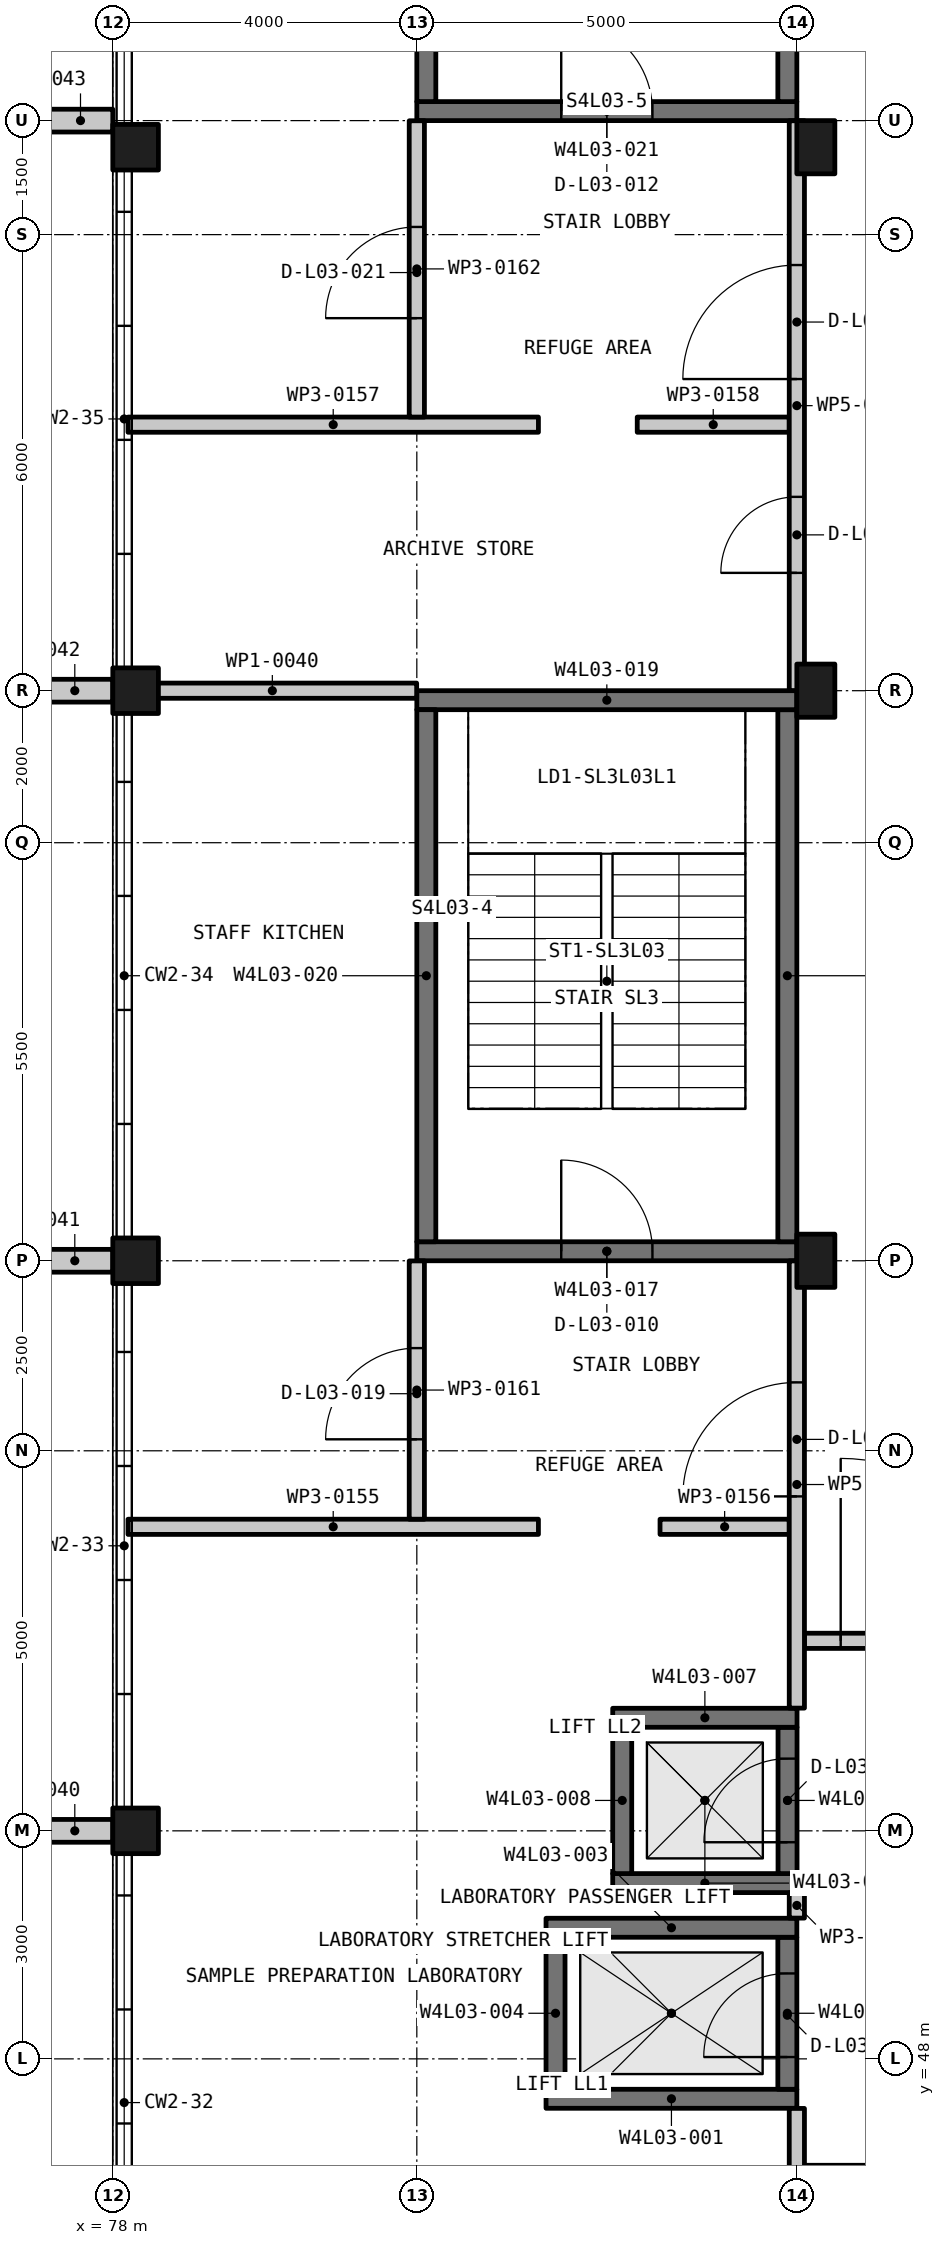
"""IFC4 building model, lengths in metres.
Left out: names, types, materials, properties, quantities, classifications, styles, units other than length and angle.
Written with IfcOpenShell. Run it as: python <this file> out.ifc"""

import sys

from ifc_helpers import new_model, si_unit, direction, frame, frame_2d, origin, origin_2d, place, context, subcontext, project, spatial, rectangle, extrude, element, fill, save


model = new_model("IFC4")
c1 = context("Model", 3, precision=1e-05, world=origin(), true_north=direction((0.0, 1.0)))
c2 = subcontext(c1, "Body", "Model", "MODEL_VIEW")
j1 = project(units=[si_unit("LENGTHUNIT", "METRE"), si_unit("PLANEANGLEUNIT", "RADIAN")], contexts=[c1])
p1 = place(None, origin())
s1 = spatial("IfcSite", under=j1, at=p1, CompositionType="ELEMENT")
p2 = place(p1, origin())
s2 = spatial("IfcBuilding", under=s1, at=p2, CompositionType="ELEMENT")
p3 = place(p2, frame((0.0, 0.0, 15.75)))
s3 = spatial("IfcBuildingStorey", under=s2, at=p3, CompositionType="ELEMENT", Elevation=15.75)
for number, where, z_axis, x_axis in (
    (1, (78.3, 51.0, -0.3), (0.0, 0.0, 1.0), (1.0, 0.0, 0.0)),
    (2, (78.3, 58.5, -0.3), (0.0, 0.0, 1.0), (1.0, 0.0, 0.0)),
    (3, (78.3, 66.0, -0.3), (0.0, 0.0, 1.0), (1.0, 0.0, 0.0)),
    (4, (78.3, 73.15, -0.3), (0.0, 0.0, 1.0), (1.0, 0.0, 0.0)),
):
    element("IfcColumn", number, at=place(p3, frame(where, z_axis=z_axis, x_axis=x_axis)), inside=s3, PredefinedType="COLUMN", context=c2, shape_type="SweptSolid", body=[
        extrude(rectangle(XDim=0.6, YDim=0.6, at=origin_2d()), origin(), (0.0, 0.0, 1.0), 4.5),
    ])
for number, where, z_axis, x_axis in (
    (5, (87.25, 58.5, -0.3), (0.0, 0.0, 1.0), (1.0, 0.0, 0.0)),
    (6, (87.25, 66.0, -0.3), (0.0, 0.0, 1.0), (1.0, 0.0, 0.0)),
    (7, (87.25, 73.15, -0.3), (0.0, 0.0, 1.0), (1.0, 0.0, 0.0)),
):
    element("IfcColumn", number, at=place(p3, frame(where, z_axis=z_axis, x_axis=x_axis)), inside=s3, PredefinedType="COLUMN", context=c2, shape_type="SweptSolid", body=[
        extrude(rectangle(XDim=0.5, YDim=0.7, at=origin_2d()), origin(), (0.0, 0.0, 1.0), 4.5),
    ])
p4 = place(p3, frame((83.7, 47.475, -0.3), z_axis=(0.0, 0.0, 1.0), x_axis=(1.0, 0.0, 0.0)))
e8 = element("IfcWall", 8, at=p4, inside=s3, PredefinedType="SHEAR", context=c2, shape_type="SweptSolid", body=[
    extrude(rectangle(XDim=3.3, YDim=0.25, at=frame_2d((1.65, 0.0))), origin(), (0.0, 0.0, 1.0), 4.5),
])
p5 = place(p3, frame((86.875, 47.6, -0.3), z_axis=(0.0, 0.0, 1.0), x_axis=(0.0, 1.0, 0.0)))
e9 = element("IfcWall", 9, at=p5, inside=s3, PredefinedType="SHEAR", context=c2, shape_type="SweptSolid", body=[
    extrude(rectangle(XDim=2.0, YDim=0.25, at=frame_2d((1.0, 0.0))), origin(), (0.0, 0.0, 1.0), 4.5),
])
p6 = place(p5, frame((0.424, 0.0, 0.3)))
e10 = element("IfcOpeningElement", 10, at=p6, cuts=e9, PredefinedType="OPENING", context=c2, shape_type="SweptSolid", body=[
    extrude(rectangle(XDim=1.1, YDim=2.1, at=frame_2d((0.55, 1.05))), frame((0.0, 0.135, 0.0), z_axis=(0.0, -1.0, 0.0), x_axis=(1.0, 0.0, 0.0)), (0.0, 0.0, 1.0), 0.27),
])
p7 = place(p3, frame((83.7, 49.725, -0.3), z_axis=(0.0, 0.0, 1.0), x_axis=(1.0, 0.0, 0.0)))
e11 = element("IfcWall", 11, at=p7, inside=s3, PredefinedType="SHEAR", context=c2, shape_type="SweptSolid", body=[
    extrude(rectangle(XDim=3.3, YDim=0.25, at=frame_2d((1.65, 0.0))), origin(), (0.0, 0.0, 1.0), 4.5),
])
p8 = place(p3, frame((83.825, 47.6, -0.3), z_axis=(0.0, 0.0, 1.0), x_axis=(0.0, 1.0, 0.0)))
e12 = element("IfcWall", 12, at=p8, inside=s3, PredefinedType="SHEAR", context=c2, shape_type="SweptSolid", body=[
    extrude(rectangle(XDim=2.0, YDim=0.25, at=frame_2d((1.0, 0.0))), origin(), (0.0, 0.0, 1.0), 4.5),
])
p9 = place(p3, frame((84.577, 50.312, -0.3), z_axis=(0.0, 0.0, 1.0), x_axis=(1.0, 0.0, 0.0)))
e13 = element("IfcWall", 13, at=p9, inside=s3, PredefinedType="SHEAR", context=c2, shape_type="SweptSolid", body=[
    extrude(rectangle(XDim=2.425, YDim=0.25, at=frame_2d((1.212, 0.0))), origin(), (0.0, 0.0, 1.0), 4.5),
])
p10 = place(p3, frame((86.877, 50.438, -0.3), z_axis=(0.0, 0.0, 1.0), x_axis=(0.0, 1.0, 0.0)))
e14 = element("IfcWall", 14, at=p10, inside=s3, PredefinedType="SHEAR", context=c2, shape_type="SweptSolid", body=[
    extrude(rectangle(XDim=1.925, YDim=0.25, at=frame_2d((0.962, 0.0))), origin(), (0.0, 0.0, 1.0), 4.5),
])
p11 = place(p10, frame((0.413, 0.0, 0.3)))
e15 = element("IfcOpeningElement", 15, at=p11, cuts=e14, PredefinedType="OPENING", context=c2, shape_type="SweptSolid", body=[
    extrude(rectangle(XDim=1.1, YDim=2.1, at=frame_2d((0.55, 1.05))), frame((0.0, 0.135, 0.0), z_axis=(0.0, -1.0, 0.0), x_axis=(1.0, 0.0, 0.0)), (0.0, 0.0, 1.0), 0.27),
])
p12 = place(p3, frame((84.577, 52.488, -0.3), z_axis=(0.0, 0.0, 1.0), x_axis=(1.0, 0.0, 0.0)))
e16 = element("IfcWall", 16, at=p12, inside=s3, PredefinedType="SHEAR", context=c2, shape_type="SweptSolid", body=[
    extrude(rectangle(XDim=2.425, YDim=0.25, at=frame_2d((1.212, 0.0))), origin(), (0.0, 0.0, 1.0), 4.5),
])
p13 = place(p3, frame((84.702, 50.438, -0.3), z_axis=(0.0, 0.0, 1.0), x_axis=(0.0, 1.0, 0.0)))
e17 = element("IfcWall", 17, at=p13, inside=s3, PredefinedType="SHEAR", context=c2, shape_type="SweptSolid", body=[
    extrude(rectangle(XDim=1.925, YDim=0.25, at=frame_2d((0.962, 0.0))), origin(), (0.0, 0.0, 1.0), 4.5),
])
p14 = place(p3, frame((82.0, 58.625, -0.3), z_axis=(0.0, 0.0, 1.0), x_axis=(1.0, 0.0, 0.0)))
e18 = element("IfcWall", 18, at=p14, inside=s3, PredefinedType="SHEAR", context=c2, shape_type="SweptSolid", body=[
    extrude(rectangle(XDim=5.0, YDim=0.25, at=frame_2d((2.5, 0.0))), origin(), (0.0, 0.0, 1.0), 4.5),
])
p15 = place(p14, frame((1.9, 0.0, 0.3)))
e19 = element("IfcOpeningElement", 19, at=p15, cuts=e18, PredefinedType="OPENING", context=c2, shape_type="SweptSolid", body=[
    extrude(rectangle(XDim=1.2, YDim=2.2, at=frame_2d((0.6, 1.1))), frame((0.0, 0.135, 0.0), z_axis=(0.0, -1.0, 0.0), x_axis=(1.0, 0.0, 0.0)), (0.0, 0.0, 1.0), 0.27),
])
p16 = place(p3, frame((86.875, 58.75, -0.3), z_axis=(0.0, 0.0, 1.0), x_axis=(0.0, 1.0, 0.0)))
e20 = element("IfcWall", 20, at=p16, inside=s3, PredefinedType="SHEAR", context=c2, shape_type="SweptSolid", body=[
    extrude(rectangle(XDim=7.0, YDim=0.25, at=frame_2d((3.5, 0.0))), origin(), (0.0, 0.0, 1.0), 4.5),
])
p17 = place(p3, frame((82.0, 65.875, -0.3), z_axis=(0.0, 0.0, 1.0), x_axis=(1.0, 0.0, 0.0)))
e21 = element("IfcWall", 21, at=p17, inside=s3, PredefinedType="SHEAR", context=c2, shape_type="SweptSolid", body=[
    extrude(rectangle(XDim=5.0, YDim=0.25, at=frame_2d((2.5, 0.0))), origin(), (0.0, 0.0, 1.0), 4.5),
])
p18 = place(p3, frame((82.125, 58.75, -0.3), z_axis=(0.0, 0.0, 1.0), x_axis=(0.0, 1.0, 0.0)))
e22 = element("IfcWall", 22, at=p18, inside=s3, PredefinedType="SHEAR", context=c2, shape_type="SweptSolid", body=[
    extrude(rectangle(XDim=7.0, YDim=0.25, at=frame_2d((3.5, 0.0))), origin(), (0.0, 0.0, 1.0), 4.5),
])
p19 = place(p3, frame((82.0, 73.625, -0.3), z_axis=(0.0, 0.0, 1.0), x_axis=(1.0, 0.0, 0.0)))
e23 = element("IfcWall", 23, at=p19, inside=s3, PredefinedType="SHEAR", context=c2, shape_type="SweptSolid", body=[
    extrude(rectangle(XDim=5.0, YDim=0.25, at=frame_2d((2.5, 0.0))), origin(), (0.0, 0.0, 1.0), 4.5),
])
p20 = place(p19, frame((1.9, 0.0, 0.3)))
e24 = element("IfcOpeningElement", 24, at=p20, cuts=e23, PredefinedType="OPENING", context=c2, shape_type="SweptSolid", body=[
    extrude(rectangle(XDim=1.2, YDim=2.2, at=frame_2d((0.6, 1.1))), frame((0.0, 0.135, 0.0), z_axis=(0.0, -1.0, 0.0), x_axis=(1.0, 0.0, 0.0)), (0.0, 0.0, 1.0), 0.27),
])
for number, where, z_axis, x_axis in (
    (25, (86.875, 73.75, -0.3), (0.0, 0.0, 1.0), (0.0, 1.0, 0.0)),
    (26, (82.125, 73.75, -0.3), (0.0, 0.0, 1.0), (0.0, 1.0, 0.0)),
):
    element("IfcWall", number, at=place(p3, frame(where, z_axis=z_axis, x_axis=x_axis)), inside=s3, PredefinedType="SHEAR", context=c2, shape_type="SweptSolid", body=[
        extrude(rectangle(XDim=7.0, YDim=0.25, at=frame_2d((3.5, 0.0))), origin(), (0.0, 0.0, 1.0), 4.5),
    ])
for number, where, z_axis, x_axis in (
    (27, (77.0, 51.0, 0.0), (0.0, 0.0, 1.0), (1.0, 0.0, 0.0)),
    (28, (77.0, 58.5, 0.0), (0.0, 0.0, 1.0), (1.0, 0.0, 0.0)),
    (29, (77.0, 66.0, 0.0), (0.0, 0.0, 1.0), (1.0, 0.0, 0.0)),
):
    element("IfcWall", number, at=place(p3, frame(where, z_axis=z_axis, x_axis=x_axis)), inside=s3, PredefinedType="SOLIDWALL", context=c2, shape_type="SweptSolid", body=[
        extrude(rectangle(XDim=1.0, YDim=0.3, at=frame_2d((0.5, 0.0))), origin(), (0.0, 0.0, 1.0), 4.5),
    ])
p21 = place(p3, frame((77.15, 73.5, 0.0), z_axis=(0.0, 0.0, 1.0), x_axis=(1.0, 0.0, 0.0)))
e30 = element("IfcWall", 30, at=p21, inside=s3, PredefinedType="SOLIDWALL", context=c2, shape_type="SweptSolid", body=[
    extrude(rectangle(XDim=0.85, YDim=0.3, at=frame_2d((0.425, 0.0))), origin(), (0.0, 0.0, 1.0), 4.5),
])
p22 = place(p3, frame((87.1, 53.5, 0.0), z_axis=(0.0, 0.0, 1.0), x_axis=(1.0, 0.0, 0.0)))
e31 = element("IfcWall", 31, at=p22, inside=s3, PredefinedType="PARTITIONING", context=c2, shape_type="SweptSolid", body=[
    extrude(rectangle(XDim=3.3, YDim=0.2, at=frame_2d((1.65, 0.0))), origin(), (0.0, 0.0, 1.0), 3.4),
])
p23 = place(p22, frame((0.477, 0.0, 0.0)))
e32 = element("IfcOpeningElement", 32, at=p23, cuts=e31, PredefinedType="OPENING", context=c2, shape_type="SweptSolid", body=[
    extrude(rectangle(XDim=2.4, YDim=2.1, at=frame_2d((1.2, 1.05))), frame((0.0, 0.11, 0.0), z_axis=(0.0, -1.0, 0.0), x_axis=(1.0, 0.0, 0.0)), (0.0, 0.0, 1.0), 0.22),
])
p24 = place(p3, frame((78.2, 55.0, 0.0), z_axis=(0.0, 0.0, 1.0), x_axis=(1.0, 0.0, 0.0)))
e33 = element("IfcWall", 33, at=p24, inside=s3, PredefinedType="PARTITIONING", context=c2, shape_type="SweptSolid", body=[
    extrude(rectangle(XDim=5.4, YDim=0.2, at=frame_2d((2.7, 0.0))), origin(), (0.0, 0.0, 1.0), 3.4),
])
p25 = place(p3, frame((85.2, 55.0, 0.0), z_axis=(0.0, 0.0, 1.0), x_axis=(1.0, 0.0, 0.0)))
e34 = element("IfcWall", 34, at=p25, inside=s3, PredefinedType="PARTITIONING", context=c2, shape_type="SweptSolid", body=[
    extrude(rectangle(XDim=1.7, YDim=0.2, at=frame_2d((0.85, 0.0))), origin(), (0.0, 0.0, 1.0), 3.6),
])
p26 = place(p3, frame((78.2, 66.0, 0.0), z_axis=(0.0, 0.0, 1.0), x_axis=(1.0, 0.0, 0.0)))
e35 = element("IfcWall", 35, at=p26, inside=s3, PredefinedType="PARTITIONING", context=c2, shape_type="SweptSolid", body=[
    extrude(rectangle(XDim=3.798, YDim=0.2, at=frame_2d((1.899, 0.0))), origin(), (0.0, 0.0, 1.0), 3.4),
])
p27 = place(p3, frame((78.2, 69.5, 0.0), z_axis=(0.0, 0.0, 1.0), x_axis=(1.0, 0.0, 0.0)))
e36 = element("IfcWall", 36, at=p27, inside=s3, PredefinedType="PARTITIONING", context=c2, shape_type="SweptSolid", body=[
    extrude(rectangle(XDim=5.4, YDim=0.2, at=frame_2d((2.7, 0.0))), origin(), (0.0, 0.0, 1.0), 3.4),
])
p28 = place(p3, frame((84.9, 69.5, 0.0), z_axis=(0.0, 0.0, 1.0), x_axis=(1.0, 0.0, 0.0)))
e37 = element("IfcWall", 37, at=p28, inside=s3, PredefinedType="PARTITIONING", context=c2, shape_type="SweptSolid", body=[
    extrude(rectangle(XDim=2.0, YDim=0.2, at=frame_2d((1.0, 0.0))), origin(), (0.0, 0.0, 1.0), 3.6),
])
p29 = place(p3, frame((87.0, 43.502, 0.0), z_axis=(0.0, 0.0, 1.0), x_axis=(0.0, 1.0, 0.0)))
e38 = element("IfcWall", 38, at=p29, inside=s3, PredefinedType="PARTITIONING", context=c2, shape_type="SweptSolid", body=[
    extrude(rectangle(XDim=3.846, YDim=0.2, at=frame_2d((1.923, 0.0))), origin(), (0.0, 0.0, 1.0), 3.4),
])
p30 = place(p29, frame((0.899, 0.0, 0.0)))
e39 = element("IfcOpeningElement", 39, at=p30, cuts=e38, PredefinedType="OPENING", context=c2, shape_type="SweptSolid", body=[
    extrude(rectangle(XDim=1.2, YDim=2.1, at=frame_2d((0.6, 1.05))), frame((0.0, 0.11, 0.0), z_axis=(0.0, -1.0, 0.0), x_axis=(1.0, 0.0, 0.0)), (0.0, 0.0, 1.0), 0.22),
])
p31 = place(p3, frame((87.0, 49.852, 0.0), z_axis=(0.0, 0.0, 1.0), x_axis=(0.0, 1.0, 0.0)))
e40 = element("IfcWall", 40, at=p31, inside=s3, PredefinedType="PARTITIONING", context=c2, shape_type="SweptSolid", body=[
    extrude(rectangle(XDim=0.333, YDim=0.2, at=frame_2d((0.167, 0.0))), origin(), (0.0, 0.0, 1.0), 3.4),
])
p32 = place(p3, frame((87.0, 52.615, 0.0), z_axis=(0.0, 0.0, 1.0), x_axis=(0.0, 1.0, 0.0)))
e41 = element("IfcWall", 41, at=p32, inside=s3, PredefinedType="PARTITIONING", context=c2, shape_type="SweptSolid", body=[
    extrude(rectangle(XDim=5.884, YDim=0.2, at=frame_2d((2.942, 0.0))), origin(), (0.0, 0.0, 1.0), 3.4),
])
p33 = place(p32, frame((2.785, 0.0, 0.0)))
e42 = element("IfcOpeningElement", 42, at=p33, cuts=e41, PredefinedType="OPENING", context=c2, shape_type="SweptSolid", body=[
    extrude(rectangle(XDim=1.5, YDim=2.1, at=frame_2d((0.75, 1.05))), frame((0.0, 0.11, 0.0), z_axis=(0.0, -1.0, 0.0), x_axis=(1.0, 0.0, 0.0)), (0.0, 0.0, 1.0), 0.22),
])
p34 = place(p3, frame((87.0, 66.002, 0.0), z_axis=(0.0, 0.0, 1.0), x_axis=(0.0, 1.0, 0.0)))
e43 = element("IfcWall", 43, at=p34, inside=s3, PredefinedType="PARTITIONING", context=c2, shape_type="SweptSolid", body=[
    extrude(rectangle(XDim=7.496, YDim=0.2, at=frame_2d((3.748, 0.0))), origin(), (0.0, 0.0, 1.0), 3.4),
])
p35 = place(p34, frame((4.098, 0.0, 0.0)))
e44 = element("IfcOpeningElement", 44, at=p35, cuts=e43, PredefinedType="OPENING", context=c2, shape_type="SweptSolid", body=[
    extrude(rectangle(XDim=1.5, YDim=2.1, at=frame_2d((0.75, 1.05))), frame((0.0, 0.11, 0.0), z_axis=(0.0, -1.0, 0.0), x_axis=(1.0, 0.0, 0.0)), (0.0, 0.0, 1.0), 0.22),
])
p36 = place(p34, frame((1.548, 0.0, 0.0)))
e45 = element("IfcOpeningElement", 45, at=p36, cuts=e43, PredefinedType="OPENING", context=c2, shape_type="SweptSolid", body=[
    extrude(rectangle(XDim=1.0, YDim=2.1, at=frame_2d((0.5, 1.05))), frame((0.0, 0.11, 0.0), z_axis=(0.0, -1.0, 0.0), x_axis=(1.0, 0.0, 0.0)), (0.0, 0.0, 1.0), 0.22),
])
p37 = place(p3, frame((82.0, 55.1, 0.0), z_axis=(0.0, 0.0, 1.0), x_axis=(0.0, 1.0, 0.0)))
e46 = element("IfcWall", 46, at=p37, inside=s3, PredefinedType="PARTITIONING", context=c2, shape_type="SweptSolid", body=[
    extrude(rectangle(XDim=3.398, YDim=0.2, at=frame_2d((1.699, 0.0))), origin(), (0.0, 0.0, 1.0), 3.4),
])
p38 = place(p37, frame((1.051, 0.0, 0.0)))
e47 = element("IfcOpeningElement", 47, at=p38, cuts=e46, PredefinedType="OPENING", context=c2, shape_type="SweptSolid", body=[
    extrude(rectangle(XDim=1.2, YDim=2.1, at=frame_2d((0.6, 1.05))), frame((0.0, 0.11, 0.0), z_axis=(0.0, -1.0, 0.0), x_axis=(1.0, 0.0, 0.0)), (0.0, 0.0, 1.0), 0.22),
])
p39 = place(p3, frame((82.0, 69.6, 0.0), z_axis=(0.0, 0.0, 1.0), x_axis=(0.0, 1.0, 0.0)))
e48 = element("IfcWall", 48, at=p39, inside=s3, PredefinedType="PARTITIONING", context=c2, shape_type="SweptSolid", body=[
    extrude(rectangle(XDim=3.898, YDim=0.2, at=frame_2d((1.949, 0.0))), origin(), (0.0, 0.0, 1.0), 3.4),
])
p40 = place(p39, frame((1.301, 0.0, 0.0)))
e49 = element("IfcOpeningElement", 49, at=p40, cuts=e48, PredefinedType="OPENING", context=c2, shape_type="SweptSolid", body=[
    extrude(rectangle(XDim=1.2, YDim=2.1, at=frame_2d((0.6, 1.05))), frame((0.0, 0.11, 0.0), z_axis=(0.0, -1.0, 0.0), x_axis=(1.0, 0.0, 0.0)), (0.0, 0.0, 1.0), 0.22),
])
p41 = place(p23, origin())
e50 = element("IfcDoor", 50, at=p41, inside=s3, OperationType="DOUBLE_DOOR_SINGLE_SWING", PredefinedType="DOOR", context=c2, shape_type="SweptSolid", body=[
    extrude(rectangle(XDim=2.4, YDim=2.1, at=frame_2d((1.2, 1.05))), frame((0.0, 0.025, 0.0), z_axis=(0.0, -1.0, 0.0), x_axis=(1.0, 0.0, 0.0)), (0.0, 0.0, 1.0), 0.05),
])
fill(e32, e50)
p42 = place(p6, origin())
e51 = element("IfcDoor", 51, at=p42, inside=s3, OperationType="DOUBLE_DOOR_SLIDING", PredefinedType="DOOR", context=c2, shape_type="SweptSolid", body=[
    extrude(rectangle(XDim=1.1, YDim=2.1, at=frame_2d((0.55, 1.05))), frame((0.0, 0.025, 0.0), z_axis=(0.0, -1.0, 0.0), x_axis=(1.0, 0.0, 0.0)), (0.0, 0.0, 1.0), 0.05),
])
fill(e10, e51)
p43 = place(p11, origin())
e52 = element("IfcDoor", 52, at=p43, inside=s3, OperationType="DOUBLE_DOOR_SLIDING", PredefinedType="DOOR", context=c2, shape_type="SweptSolid", body=[
    extrude(rectangle(XDim=1.1, YDim=2.1, at=frame_2d((0.55, 1.05))), frame((0.0, 0.025, 0.0), z_axis=(0.0, -1.0, 0.0), x_axis=(1.0, 0.0, 0.0)), (0.0, 0.0, 1.0), 0.05),
])
fill(e15, e52)
p44 = place(p15, origin())
e53 = element("IfcDoor", 53, at=p44, inside=s3, OperationType="SINGLE_SWING_LEFT", PredefinedType="DOOR", context=c2, shape_type="SweptSolid", body=[
    extrude(rectangle(XDim=1.2, YDim=2.2, at=frame_2d((0.6, 1.1))), frame((0.0, 0.025, 0.0), z_axis=(0.0, -1.0, 0.0), x_axis=(1.0, 0.0, 0.0)), (0.0, 0.0, 1.0), 0.05),
])
fill(e19, e53)
p45 = place(p33, origin())
e54 = element("IfcDoor", 54, at=p45, inside=s3, OperationType="DOUBLE_DOOR_SINGLE_SWING", PredefinedType="DOOR", context=c2, shape_type="SweptSolid", body=[
    extrude(rectangle(XDim=1.5, YDim=2.1, at=frame_2d((0.75, 1.05))), frame((0.0, 0.025, 0.0), z_axis=(0.0, -1.0, 0.0), x_axis=(1.0, 0.0, 0.0)), (0.0, 0.0, 1.0), 0.05),
])
fill(e42, e54)
p46 = place(p20, origin())
e55 = element("IfcDoor", 55, at=p46, inside=s3, OperationType="SINGLE_SWING_LEFT", PredefinedType="DOOR", context=c2, shape_type="SweptSolid", body=[
    extrude(rectangle(XDim=1.2, YDim=2.2, at=frame_2d((0.6, 1.1))), frame((0.0, 0.025, 0.0), z_axis=(0.0, -1.0, 0.0), x_axis=(1.0, 0.0, 0.0)), (0.0, 0.0, 1.0), 0.05),
])
fill(e24, e55)
p47 = place(p35, origin())
e56 = element("IfcDoor", 56, at=p47, inside=s3, OperationType="DOUBLE_DOOR_SINGLE_SWING", PredefinedType="DOOR", context=c2, shape_type="SweptSolid", body=[
    extrude(rectangle(XDim=1.5, YDim=2.1, at=frame_2d((0.75, 1.05))), frame((0.0, 0.025, 0.0), z_axis=(0.0, -1.0, 0.0), x_axis=(1.0, 0.0, 0.0)), (0.0, 0.0, 1.0), 0.05),
])
fill(e44, e56)
p48 = place(p38, origin())
e57 = element("IfcDoor", 57, at=p48, inside=s3, OperationType="SINGLE_SWING_RIGHT", PredefinedType="DOOR", context=c2, shape_type="SweptSolid", body=[
    extrude(rectangle(XDim=1.2, YDim=2.1, at=frame_2d((0.6, 1.05))), frame((0.0, 0.025, 0.0), z_axis=(0.0, -1.0, 0.0), x_axis=(1.0, 0.0, 0.0)), (0.0, 0.0, 1.0), 0.05),
])
fill(e47, e57)
p49 = place(p36, origin())
e58 = element("IfcDoor", 58, at=p49, inside=s3, OperationType="SINGLE_SWING_RIGHT", PredefinedType="DOOR", context=c2, shape_type="SweptSolid", body=[
    extrude(rectangle(XDim=1.0, YDim=2.1, at=frame_2d((0.5, 1.05))), frame((0.0, 0.025, 0.0), z_axis=(0.0, -1.0, 0.0), x_axis=(1.0, 0.0, 0.0)), (0.0, 0.0, 1.0), 0.05),
])
fill(e45, e58)
p50 = place(p40, origin())
e59 = element("IfcDoor", 59, at=p50, inside=s3, OperationType="SINGLE_SWING_RIGHT", PredefinedType="DOOR", context=c2, shape_type="SweptSolid", body=[
    extrude(rectangle(XDim=1.2, YDim=2.1, at=frame_2d((0.6, 1.05))), frame((0.0, 0.025, 0.0), z_axis=(0.0, -1.0, 0.0), x_axis=(1.0, 0.0, 0.0)), (0.0, 0.0, 1.0), 0.05),
])
fill(e49, e59)
save(model, sys.argv[1])
